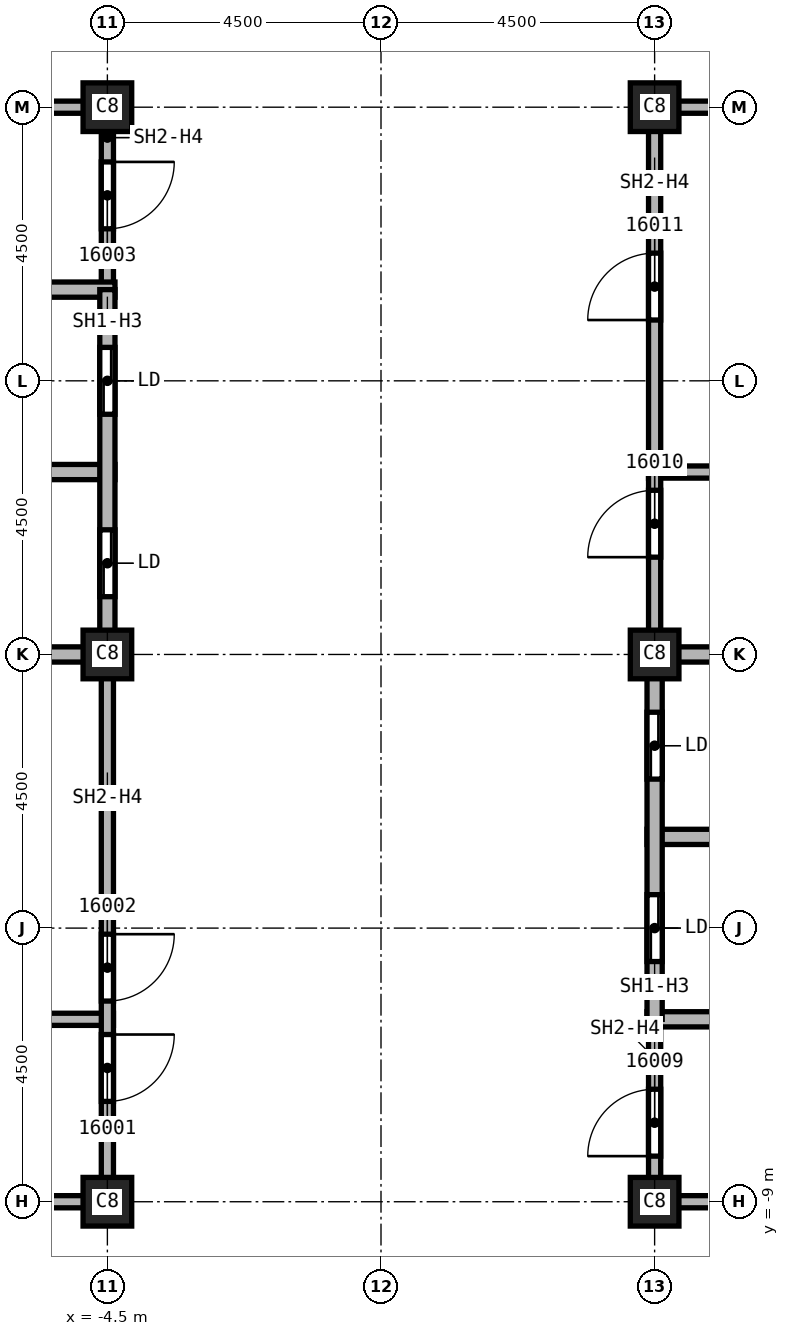
"""IFC4 building model, lengths in metres.
Left out: names, types, materials, properties, quantities, classifications, styles, units other than length and angle.
Written with IfcOpenShell. Run it as: python <this file> out.ifc"""

import sys

from ifc_helpers import new_model, si_unit, direction, frame, frame_2d, origin, origin_2d, place, context, subcontext, project, spatial, rectangle, extrude, element, fill, save


model = new_model("IFC4")
c1 = context("Model", 3, precision=1e-05, world=origin(), true_north=direction((0.0, 1.0)))
c2 = subcontext(c1, "Body", "Model", "MODEL_VIEW")
j1 = project(units=[si_unit("LENGTHUNIT", "METRE"), si_unit("PLANEANGLEUNIT", "RADIAN")], contexts=[c1])
p1 = place(None, origin())
s1 = spatial("IfcSite", under=j1, at=p1, CompositionType="ELEMENT")
p2 = place(p1, origin())
s2 = spatial("IfcBuilding", under=s1, at=p2, CompositionType="ELEMENT")
p3 = place(p2, frame((0.0, 0.0, 246.0)))
s3 = spatial("IfcBuildingStorey", under=s2, at=p3, CompositionType="ELEMENT", Elevation=246.0)
for number, where, z_axis, x_axis in (
    (1, (4.5, 0.0, 0.0), (0.0, 0.0, 1.0), (1.0, 0.0, 0.0)),
    (2, (4.5, 9.0, 0.0), (0.0, 0.0, 1.0), (1.0, 0.0, 0.0)),
    (3, (4.5, -9.0, 0.0), (0.0, 0.0, 1.0), (1.0, 0.0, 0.0)),
    (4, (-4.5, 0.0, 0.0), (0.0, 0.0, 1.0), (1.0, 0.0, 0.0)),
    (5, (-4.5, 9.0, 0.0), (0.0, 0.0, 1.0), (1.0, 0.0, 0.0)),
    (6, (-4.5, -9.0, 0.0), (0.0, 0.0, 1.0), (1.0, 0.0, 0.0)),
):
    element("IfcColumn", number, at=place(p3, frame(where, z_axis=z_axis, x_axis=x_axis)), inside=s3, PredefinedType="COLUMN", context=c2, shape_type="SweptSolid", body=[
        extrude(rectangle(XDim=0.8, YDim=0.8, at=origin_2d()), origin(), (0.0, 0.0, 1.0), 3.72),
    ])
p4 = place(p3, frame((-7.6, -6.0, 0.0), z_axis=(0.0, 0.0, 1.0), x_axis=(1.0, 0.0, 0.0)))
e7 = element("IfcWall", 7, at=p4, inside=s3, PredefinedType="SOLIDWALL", context=c2, shape_type="SweptSolid", body=[
    extrude(rectangle(XDim=3.2, YDim=0.2, at=frame_2d((1.6, 0.0))), origin(), (0.0, 0.0, 1.0), 3.72),
])
for number, where, z_axis, x_axis in (
    (8, (-7.5, 9.0, 0.0), (0.0, 0.0, 1.0), (1.0, 0.0, 0.0)),
    (9, (-4.5, -9.0, 0.0), (0.0, 0.0, 1.0), (-1.0, 0.0, 0.0)),
):
    element("IfcWall", number, at=place(p3, frame(where, z_axis=z_axis, x_axis=x_axis)), inside=s3, PredefinedType="SOLIDWALL", context=c2, shape_type="SweptSolid", body=[
        extrude(rectangle(XDim=3.0, YDim=0.2, at=frame_2d((1.5, 0.0))), origin(), (0.0, 0.0, 1.0), 3.042),
    ])
p5 = place(p3, frame((-4.5, 0.0, 0.0), z_axis=(0.0, 0.0, 1.0), x_axis=(0.0, -1.0, 0.0)))
e10 = element("IfcWall", 10, at=p5, inside=s3, PredefinedType="SOLIDWALL", context=c2, shape_type="SweptSolid", body=[
    extrude(rectangle(XDim=9.1, YDim=0.2, at=frame_2d((4.55, 0.0))), origin(), (0.0, 0.0, 1.0), 3.042),
])
p6 = place(p5, frame((6.25, 0.0, 0.0)))
e11 = element("IfcOpeningElement", 11, at=p6, cuts=e10, PredefinedType="OPENING", context=c2, shape_type="SweptSolid", body=[
    extrude(rectangle(XDim=1.1, YDim=2.1, at=frame_2d((0.55, 1.05))), frame((0.0, 0.1, 0.0), z_axis=(0.0, -1.0, 0.0), x_axis=(1.0, 0.0, 0.0)), (0.0, 0.0, 1.0), 0.2),
])
p7 = place(p5, frame((4.6, 0.0, 0.0)))
e12 = element("IfcOpeningElement", 12, at=p7, cuts=e10, PredefinedType="OPENING", context=c2, shape_type="SweptSolid", body=[
    extrude(rectangle(XDim=1.1, YDim=2.1, at=frame_2d((0.55, 1.05))), frame((0.0, 0.1, 0.0), z_axis=(0.0, -1.0, 0.0), x_axis=(1.0, 0.0, 0.0)), (0.0, 0.0, 1.0), 0.2),
])
p8 = place(p3, frame((-4.5, 9.1, 0.0), z_axis=(0.0, 0.0, 1.0), x_axis=(0.0, -1.0, 0.0)))
e13 = element("IfcWall", 13, at=p8, inside=s3, PredefinedType="SOLIDWALL", context=c2, shape_type="SweptSolid", body=[
    extrude(rectangle(XDim=3.1, YDim=0.2, at=frame_2d((1.55, 0.0))), origin(), (0.0, 0.0, 1.0), 3.042),
])
p9 = place(p8, frame((1.0, 0.0, 0.0)))
e14 = element("IfcOpeningElement", 14, at=p9, cuts=e13, PredefinedType="OPENING", context=c2, shape_type="SweptSolid", body=[
    extrude(rectangle(XDim=1.1, YDim=2.1, at=frame_2d((0.55, 1.05))), frame((0.0, 0.1, 0.0), z_axis=(0.0, -1.0, 0.0), x_axis=(1.0, 0.0, 0.0)), (0.0, 0.0, 1.0), 0.2),
])
p10 = place(p3, frame((4.4, 3.0, 0.0), z_axis=(0.0, 0.0, 1.0), x_axis=(1.0, 0.0, 0.0)))
e15 = element("IfcWall", 15, at=p10, inside=s3, PredefinedType="SOLIDWALL", context=c2, shape_type="SweptSolid", body=[
    extrude(rectangle(XDim=3.225, YDim=0.2, at=frame_2d((1.613, 0.0))), origin(), (0.0, 0.0, 1.0), 3.72),
])
p11 = place(p3, frame((4.5, -9.1, 0.0), z_axis=(0.0, 0.0, 1.0), x_axis=(0.0, 1.0, 0.0)))
e16 = element("IfcWall", 16, at=p11, inside=s3, PredefinedType="SOLIDWALL", context=c2, shape_type="SweptSolid", body=[
    extrude(rectangle(XDim=3.1, YDim=0.2, at=frame_2d((1.55, 0.0))), origin(), (0.0, 0.0, 1.0), 3.042),
])
p12 = place(p11, frame((0.85, 0.0, 0.0)))
e17 = element("IfcOpeningElement", 17, at=p12, cuts=e16, PredefinedType="OPENING", context=c2, shape_type="SweptSolid", body=[
    extrude(rectangle(XDim=1.1, YDim=2.1, at=frame_2d((0.55, 1.05))), frame((0.0, 0.1, 0.0), z_axis=(0.0, -1.0, 0.0), x_axis=(1.0, 0.0, 0.0)), (0.0, 0.0, 1.0), 0.2),
])
p13 = place(p3, frame((4.5, 0.0, 0.0), z_axis=(0.0, 0.0, 1.0), x_axis=(0.0, 1.0, 0.0)))
e18 = element("IfcWall", 18, at=p13, inside=s3, PredefinedType="SOLIDWALL", context=c2, shape_type="SweptSolid", body=[
    extrude(rectangle(XDim=9.1, YDim=0.2, at=frame_2d((4.55, 0.0))), origin(), (0.0, 0.0, 1.0), 3.042),
])
p14 = place(p13, frame((1.6, 0.0, 0.0)))
e19 = element("IfcOpeningElement", 19, at=p14, cuts=e18, PredefinedType="OPENING", context=c2, shape_type="SweptSolid", body=[
    extrude(rectangle(XDim=1.1, YDim=2.1, at=frame_2d((0.55, 1.05))), frame((0.0, 0.1, 0.0), z_axis=(0.0, -1.0, 0.0), x_axis=(1.0, 0.0, 0.0)), (0.0, 0.0, 1.0), 0.2),
])
p15 = place(p13, frame((5.5, 0.0, 0.0)))
e20 = element("IfcOpeningElement", 20, at=p15, cuts=e18, PredefinedType="OPENING", context=c2, shape_type="SweptSolid", body=[
    extrude(rectangle(XDim=1.1, YDim=2.1, at=frame_2d((0.55, 1.05))), frame((0.0, 0.1, 0.0), z_axis=(0.0, -1.0, 0.0), x_axis=(1.0, 0.0, 0.0)), (0.0, 0.0, 1.0), 0.2),
])
for number, where, z_axis, x_axis in (
    (21, (4.5, 9.0, 0.0), (0.0, 0.0, 1.0), (1.0, 0.0, 0.0)),
    (22, (7.5, -9.0, 0.0), (0.0, 0.0, 1.0), (-1.0, 0.0, 0.0)),
):
    element("IfcWall", number, at=place(p3, frame(where, z_axis=z_axis, x_axis=x_axis)), inside=s3, PredefinedType="SOLIDWALL", context=c2, shape_type="SweptSolid", body=[
        extrude(rectangle(XDim=3.0, YDim=0.2, at=frame_2d((1.5, 0.0))), origin(), (0.0, 0.0, 1.0), 3.042),
    ])
p16 = place(p3, frame((-13.625, 3.0, 0.0), z_axis=(0.0, 0.0, 1.0), x_axis=(1.0, 0.0, 0.0)))
e23 = element("IfcWall", 23, at=p16, inside=s3, PredefinedType="SOLIDWALL", context=c2, shape_type="SweptSolid", body=[
    extrude(rectangle(XDim=9.25, YDim=0.25, at=frame_2d((4.625, 0.0))), origin(), (0.0, 0.0, 1.0), 3.72),
])
p17 = place(p16, frame((3.25, 0.0, 0.0)))
e24 = element("IfcOpeningElement", 24, at=p17, cuts=e23, PredefinedType="OPENING", context=c2, shape_type="SweptSolid", body=[
    extrude(rectangle(XDim=1.1, YDim=2.1, at=frame_2d((0.55, 1.05))), frame((0.0, 0.125, 0.0), z_axis=(0.0, -1.0, 0.0), x_axis=(1.0, 0.0, 0.0)), (0.0, 0.0, 1.0), 0.25),
])
for number, where, z_axis, x_axis in (
    (25, (-7.625, 0.0, 0.0), (0.0, 0.0, 1.0), (1.0, 0.0, 0.0)),
    (26, (-7.625, 6.0, 0.0), (0.0, 0.0, 1.0), (1.0, 0.0, 0.0)),
):
    element("IfcWall", number, at=place(p3, frame(where, z_axis=z_axis, x_axis=x_axis)), inside=s3, PredefinedType="SOLIDWALL", context=c2, shape_type="SweptSolid", body=[
        extrude(rectangle(XDim=3.25, YDim=0.25, at=frame_2d((1.625, 0.0))), origin(), (0.0, 0.0, 1.0), 3.72),
    ])
p18 = place(p3, frame((-4.5, 6.0, 0.0), z_axis=(0.0, 0.0, 1.0), x_axis=(0.0, -1.0, 0.0)))
e27 = element("IfcWall", 27, at=p18, inside=s3, PredefinedType="SOLIDWALL", context=c2, shape_type="SweptSolid", body=[
    extrude(rectangle(XDim=6.0, YDim=0.25, at=frame_2d((3.0, 0.0))), origin(), (0.0, 0.0, 1.0), 3.042),
])
p19 = place(p18, frame((3.95, 0.0, 0.0)))
e28 = element("IfcOpeningElement", 28, at=p19, cuts=e27, PredefinedType="OPENING", context=c2, shape_type="SweptSolid", body=[
    extrude(rectangle(XDim=1.1, YDim=2.1, at=frame_2d((0.55, 1.05))), frame((0.0, 0.125, 0.0), z_axis=(0.0, -1.0, 0.0), x_axis=(1.0, 0.0, 0.0)), (0.0, 0.0, 1.0), 0.25),
])
p20 = place(p18, frame((0.95, 0.0, 0.0)))
e29 = element("IfcOpeningElement", 29, at=p20, cuts=e27, PredefinedType="OPENING", context=c2, shape_type="SweptSolid", body=[
    extrude(rectangle(XDim=1.1, YDim=2.1, at=frame_2d((0.55, 1.05))), frame((0.0, 0.125, 0.0), z_axis=(0.0, -1.0, 0.0), x_axis=(1.0, 0.0, 0.0)), (0.0, 0.0, 1.0), 0.25),
])
p21 = place(p3, frame((4.375, -6.0, 0.0), z_axis=(0.0, 0.0, 1.0), x_axis=(1.0, 0.0, 0.0)))
e30 = element("IfcWall", 30, at=p21, inside=s3, PredefinedType="SOLIDWALL", context=c2, shape_type="SweptSolid", body=[
    extrude(rectangle(XDim=3.25, YDim=0.25, at=frame_2d((1.625, 0.0))), origin(), (0.0, 0.0, 1.0), 3.72),
])
p22 = place(p3, frame((4.375, -3.0, 0.0), z_axis=(0.0, 0.0, 1.0), x_axis=(1.0, 0.0, 0.0)))
e31 = element("IfcWall", 31, at=p22, inside=s3, PredefinedType="SOLIDWALL", context=c2, shape_type="SweptSolid", body=[
    extrude(rectangle(XDim=9.25, YDim=0.25, at=frame_2d((4.625, 0.0))), origin(), (0.0, 0.0, 1.0), 3.72),
])
p23 = place(p22, frame((3.375, 0.0, 0.0)))
e32 = element("IfcOpeningElement", 32, at=p23, cuts=e31, PredefinedType="OPENING", context=c2, shape_type="SweptSolid", body=[
    extrude(rectangle(XDim=1.1, YDim=2.1, at=frame_2d((0.55, 1.05))), frame((0.0, 0.125, 0.0), z_axis=(0.0, -1.0, 0.0), x_axis=(1.0, 0.0, 0.0)), (0.0, 0.0, 1.0), 0.25),
])
p24 = place(p3, frame((4.375, 0.0, 0.0), z_axis=(0.0, 0.0, 1.0), x_axis=(1.0, 0.0, 0.0)))
e33 = element("IfcWall", 33, at=p24, inside=s3, PredefinedType="SOLIDWALL", context=c2, shape_type="SweptSolid", body=[
    extrude(rectangle(XDim=3.25, YDim=0.25, at=frame_2d((1.625, 0.0))), origin(), (0.0, 0.0, 1.0), 3.72),
])
p25 = place(p3, frame((4.5, -6.0, 0.0), z_axis=(0.0, 0.0, 1.0), x_axis=(0.0, 1.0, 0.0)))
e34 = element("IfcWall", 34, at=p25, inside=s3, PredefinedType="SOLIDWALL", context=c2, shape_type="SweptSolid", body=[
    extrude(rectangle(XDim=6.0, YDim=0.25, at=frame_2d((3.0, 0.0))), origin(), (0.0, 0.0, 1.0), 3.042),
])
p26 = place(p25, frame((0.95, 0.0, 0.0)))
e35 = element("IfcOpeningElement", 35, at=p26, cuts=e34, PredefinedType="OPENING", context=c2, shape_type="SweptSolid", body=[
    extrude(rectangle(XDim=1.1, YDim=2.1, at=frame_2d((0.55, 1.05))), frame((0.0, 0.125, 0.0), z_axis=(0.0, -1.0, 0.0), x_axis=(1.0, 0.0, 0.0)), (0.0, 0.0, 1.0), 0.25),
])
p27 = place(p25, frame((3.95, 0.0, 0.0)))
e36 = element("IfcOpeningElement", 36, at=p27, cuts=e34, PredefinedType="OPENING", context=c2, shape_type="SweptSolid", body=[
    extrude(rectangle(XDim=1.1, YDim=2.1, at=frame_2d((0.55, 1.05))), frame((0.0, 0.125, 0.0), z_axis=(0.0, -1.0, 0.0), x_axis=(1.0, 0.0, 0.0)), (0.0, 0.0, 1.0), 0.25),
])
p28 = place(p6, origin())
e37 = element("IfcDoor", 37, at=p28, inside=s3, OperationType="SINGLE_SWING_RIGHT", PredefinedType="DOOR", context=c2, shape_type="SweptSolid", body=[
    extrude(rectangle(XDim=1.1, YDim=2.1, at=frame_2d((0.55, 1.05))), frame((0.0, 0.025, 0.0), z_axis=(0.0, -1.0, 0.0), x_axis=(1.0, 0.0, 0.0)), (0.0, 0.0, 1.0), 0.05),
])
fill(e11, e37)
p29 = place(p7, origin())
e38 = element("IfcDoor", 38, at=p29, inside=s3, OperationType="SINGLE_SWING_LEFT", PredefinedType="DOOR", context=c2, shape_type="SweptSolid", body=[
    extrude(rectangle(XDim=1.1, YDim=2.1, at=frame_2d((0.55, 1.05))), frame((0.0, 0.025, 0.0), z_axis=(0.0, -1.0, 0.0), x_axis=(1.0, 0.0, 0.0)), (0.0, 0.0, 1.0), 0.05),
])
fill(e12, e38)
p30 = place(p9, origin())
e39 = element("IfcDoor", 39, at=p30, inside=s3, OperationType="SINGLE_SWING_RIGHT", PredefinedType="DOOR", context=c2, shape_type="SweptSolid", body=[
    extrude(rectangle(XDim=1.1, YDim=2.1, at=frame_2d((0.55, 1.05))), frame((0.0, 0.025, 0.0), z_axis=(0.0, -1.0, 0.0), x_axis=(1.0, 0.0, 0.0)), (0.0, 0.0, 1.0), 0.05),
])
fill(e14, e39)
p31 = place(p12, origin())
e40 = element("IfcDoor", 40, at=p31, inside=s3, OperationType="SINGLE_SWING_RIGHT", PredefinedType="DOOR", context=c2, shape_type="SweptSolid", body=[
    extrude(rectangle(XDim=1.1, YDim=2.1, at=frame_2d((0.55, 1.05))), frame((0.0, 0.025, 0.0), z_axis=(0.0, -1.0, 0.0), x_axis=(1.0, 0.0, 0.0)), (0.0, 0.0, 1.0), 0.05),
])
fill(e17, e40)
p32 = place(p14, origin())
e41 = element("IfcDoor", 41, at=p32, inside=s3, OperationType="SINGLE_SWING_LEFT", PredefinedType="DOOR", context=c2, shape_type="SweptSolid", body=[
    extrude(rectangle(XDim=1.1, YDim=2.1, at=frame_2d((0.55, 1.05))), frame((0.0, 0.025, 0.0), z_axis=(0.0, -1.0, 0.0), x_axis=(1.0, 0.0, 0.0)), (0.0, 0.0, 1.0), 0.05),
])
fill(e19, e41)
p33 = place(p15, origin())
e42 = element("IfcDoor", 42, at=p33, inside=s3, OperationType="SINGLE_SWING_RIGHT", PredefinedType="DOOR", context=c2, shape_type="SweptSolid", body=[
    extrude(rectangle(XDim=1.1, YDim=2.1, at=frame_2d((0.55, 1.05))), frame((0.0, 0.025, 0.0), z_axis=(0.0, -1.0, 0.0), x_axis=(1.0, 0.0, 0.0)), (0.0, 0.0, 1.0), 0.05),
])
fill(e20, e42)
p34 = place(p19, origin())
e43 = element("IfcDoor", 43, at=p34, inside=s3, OperationType="SLIDING_TO_LEFT", PredefinedType="DOOR", context=c2, shape_type="SweptSolid", body=[
    extrude(rectangle(XDim=1.1, YDim=2.1, at=frame_2d((0.55, 1.05))), frame((0.0, 0.025, 0.0), z_axis=(0.0, -1.0, 0.0), x_axis=(1.0, 0.0, 0.0)), (0.0, 0.0, 1.0), 0.05),
])
fill(e28, e43)
p35 = place(p20, origin())
e44 = element("IfcDoor", 44, at=p35, inside=s3, OperationType="SLIDING_TO_LEFT", PredefinedType="DOOR", context=c2, shape_type="SweptSolid", body=[
    extrude(rectangle(XDim=1.1, YDim=2.1, at=frame_2d((0.55, 1.05))), frame((0.0, 0.025, 0.0), z_axis=(0.0, -1.0, 0.0), x_axis=(1.0, 0.0, 0.0)), (0.0, 0.0, 1.0), 0.05),
])
fill(e29, e44)
p36 = place(p26, origin())
e45 = element("IfcDoor", 45, at=p36, inside=s3, OperationType="SLIDING_TO_LEFT", PredefinedType="DOOR", context=c2, shape_type="SweptSolid", body=[
    extrude(rectangle(XDim=1.1, YDim=2.1, at=frame_2d((0.55, 1.05))), frame((0.0, 0.025, 0.0), z_axis=(0.0, -1.0, 0.0), x_axis=(1.0, 0.0, 0.0)), (0.0, 0.0, 1.0), 0.05),
])
fill(e35, e45)
p37 = place(p27, origin())
e46 = element("IfcDoor", 46, at=p37, inside=s3, OperationType="SLIDING_TO_LEFT", PredefinedType="DOOR", context=c2, shape_type="SweptSolid", body=[
    extrude(rectangle(XDim=1.1, YDim=2.1, at=frame_2d((0.55, 1.05))), frame((0.0, 0.025, 0.0), z_axis=(0.0, -1.0, 0.0), x_axis=(1.0, 0.0, 0.0)), (0.0, 0.0, 1.0), 0.05),
])
fill(e36, e46)
save(model, sys.argv[1])
